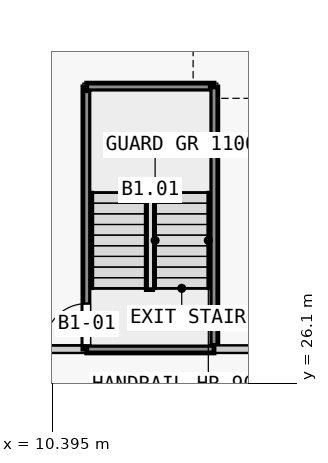
"""IFC4 building model, lengths in metres.
Left out: names, types, materials, properties, quantities, classifications, styles, units other than length and angle.
Written with IfcOpenShell. Run it as: python <this file> out.ifc"""

import sys

from ifc_helpers import new_model, si_unit, direction, frame, frame_2d, origin, place, context, subcontext, project, spatial, rectangle, extrude, element, fill, save


model = new_model("IFC4")
c1 = context("Model", 3, precision=1e-05, world=origin(), true_north=direction((0.0, 1.0)))
c2 = subcontext(c1, "Body", "Model", "MODEL_VIEW")
j1 = project(units=[si_unit("LENGTHUNIT", "METRE"), si_unit("PLANEANGLEUNIT", "RADIAN")], contexts=[c1])
p1 = place(None, origin())
s1 = spatial("IfcSite", under=j1, at=p1, CompositionType="ELEMENT")
p2 = place(p1, origin())
s2 = spatial("IfcBuilding", under=s1, at=p2, CompositionType="ELEMENT")
p3 = place(p2, frame((0.0, 0.0, -7.0)))
s3 = spatial("IfcBuildingStorey", under=s2, at=p3, CompositionType="ELEMENT", Elevation=-7.0)
p4 = place(p3, frame((9.6, 27.0, 0.0), z_axis=(0.0, 0.0, 1.0), x_axis=(1.0, 0.0, 0.0)))
e1 = element("IfcWall", 1, at=p4, inside=s3, PredefinedType="PARTITIONING", context=c2, shape_type="SweptSolid", body=[
    extrude(rectangle(XDim=1.7, YDim=0.2, at=frame_2d((0.85, 0.0))), origin(), (0.0, 0.0, 1.0), 6.55),
])
p5 = place(p3, frame((11.3, 27.0, 0.0), z_axis=(0.0, 0.0, 1.0), x_axis=(0.0, 1.0, 0.0)))
e2 = element("IfcWall", 2, at=p5, inside=s3, PredefinedType="PARTITIONING", context=c2, shape_type="SweptSolid", body=[
    extrude(rectangle(XDim=6.9, YDim=0.2, at=frame_2d((3.45, 0.0))), origin(), (0.0, 0.0, 1.0), 6.55),
])
p6 = place(p5, frame((0.1, 0.0, 0.0)))
e3 = element("IfcOpeningElement", 3, at=p6, cuts=e2, PredefinedType="OPENING", context=c2, shape_type="SweptSolid", body=[
    extrude(rectangle(XDim=1.1, YDim=2.1, at=frame_2d((0.55, 1.05))), frame((0.0, 0.11, 0.0), z_axis=(0.0, -1.0, 0.0), x_axis=(1.0, 0.0, 0.0)), (0.0, 0.0, 1.0), 0.22),
])
p7 = place(p3, frame((11.3, 33.9, 0.0), z_axis=(0.0, 0.0, 1.0), x_axis=(1.0, 0.0, 0.0)))
e4 = element("IfcWall", 4, at=p7, inside=s3, PredefinedType="PARTITIONING", context=c2, shape_type="SweptSolid", body=[
    extrude(rectangle(XDim=3.35, YDim=0.2, at=frame_2d((1.675, 0.0))), origin(), (0.0, 0.0, 1.0), 6.55),
])
p8 = place(p3, frame((14.65, 33.9, 0.0), z_axis=(0.0, 0.0, 1.0), x_axis=(0.0, -1.0, 0.0)))
e5 = element("IfcWall", 5, at=p8, inside=s3, PredefinedType="PARTITIONING", context=c2, shape_type="SweptSolid", body=[
    extrude(rectangle(XDim=6.9, YDim=0.2, at=frame_2d((3.45, 0.0))), origin(), (0.0, 0.0, 1.0), 6.55),
])
p9 = place(p3, frame((14.65, 27.0, 0.0), z_axis=(0.0, 0.0, 1.0), x_axis=(1.0, 0.0, 0.0)))
e6 = element("IfcWall", 6, at=p9, inside=s3, PredefinedType="PARTITIONING", context=c2, shape_type="SweptSolid", body=[
    extrude(rectangle(XDim=2.75, YDim=0.2, at=frame_2d((1.375, 0.0))), origin(), (0.0, 0.0, 1.0), 6.55),
])
p10 = place(p3, frame((14.65, 27.0, 0.0), z_axis=(0.0, 0.0, 1.0), x_axis=(-1.0, 0.0, 0.0)))
e7 = element("IfcWall", 7, at=p10, inside=s3, PredefinedType="PARTITIONING", context=c2, shape_type="SweptSolid", body=[
    extrude(rectangle(XDim=3.35, YDim=0.2, at=frame_2d((1.675, 0.0))), origin(), (0.0, 0.0, 1.0), 6.55),
])
p11 = place(p6, origin())
e8 = element("IfcDoor", 8, at=p11, inside=s3, OperationType="SINGLE_SWING_LEFT", PredefinedType="DOOR", context=c2, shape_type="SweptSolid", body=[
    extrude(rectangle(XDim=1.1, YDim=2.1, at=frame_2d((0.55, 1.05))), frame((0.0, 0.025, 0.0), z_axis=(0.0, -1.0, 0.0), x_axis=(1.0, 0.0, 0.0)), (0.0, 0.0, 1.0), 0.05),
])
fill(e3, e8)
save(model, sys.argv[1])
